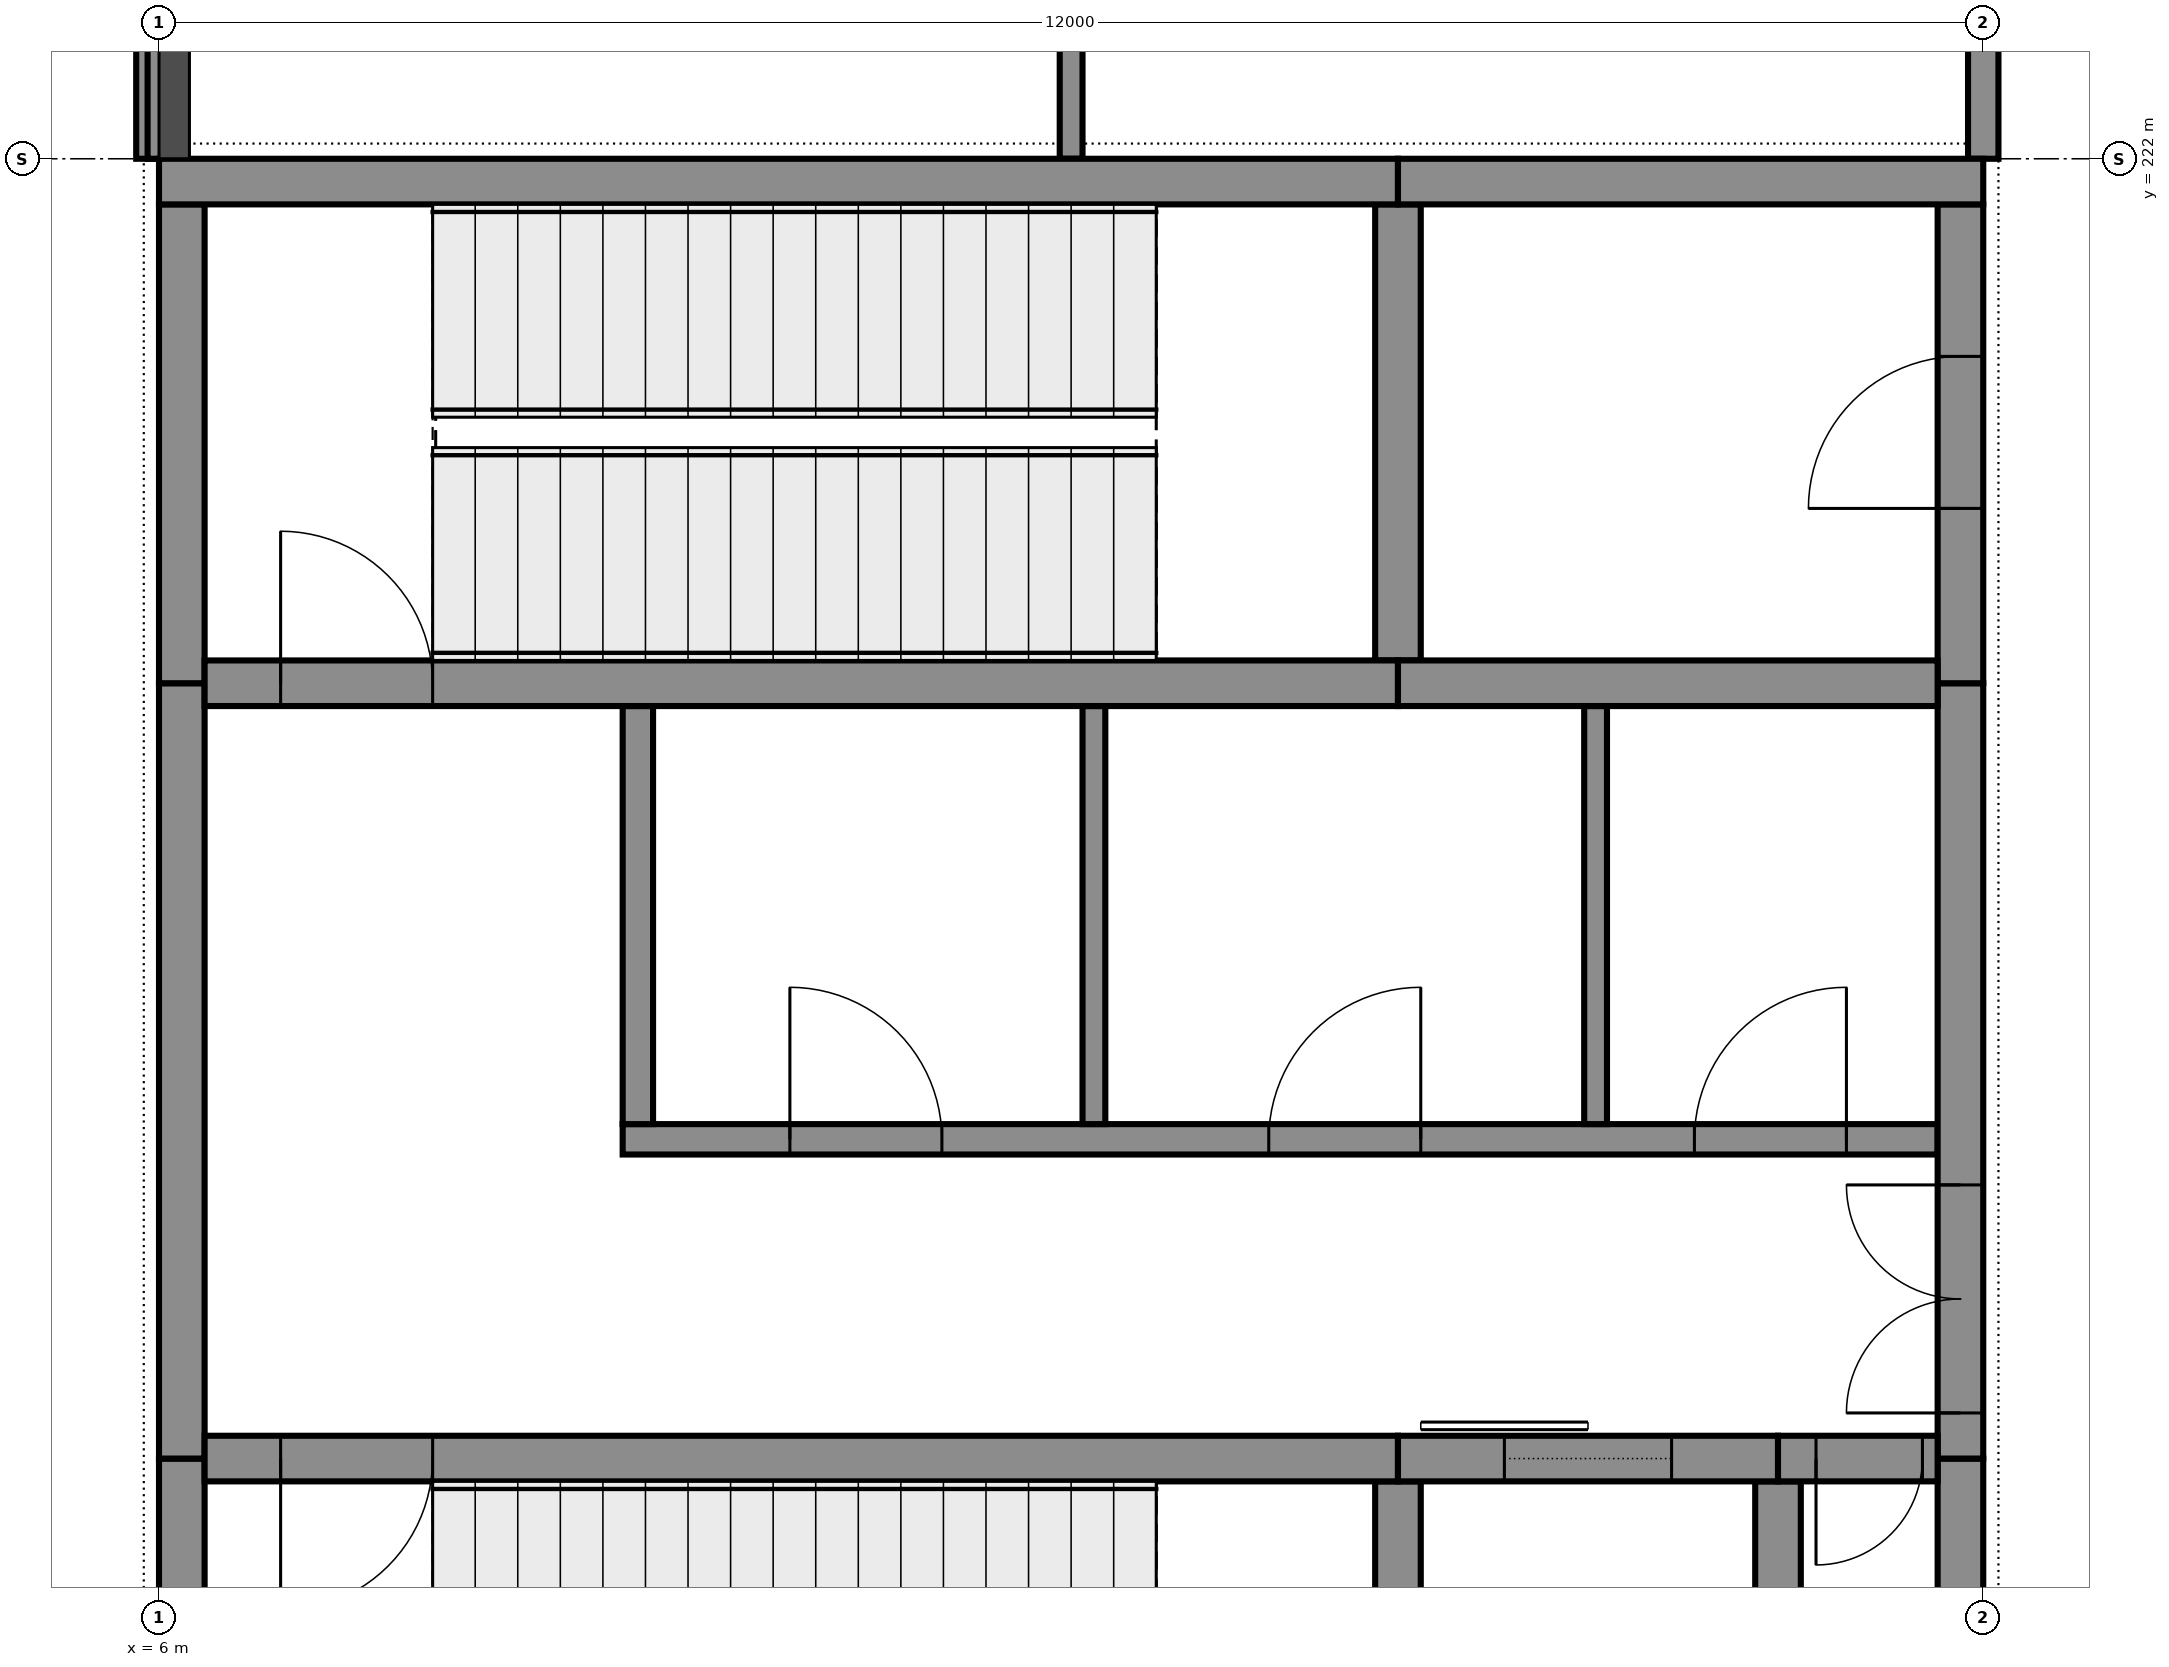
"""IFC4 building model, lengths in metres.
Left out: names, types, materials, properties, quantities, classifications, styles, units other than length and angle.
Written with IfcOpenShell. Run it as: python <this file> out.ifc"""

import sys

from ifc_helpers import new_model, si_unit, direction, frame, frame_2d, origin, place, context, subcontext, project, spatial, rectangle, extrude, element, fill, save


model = new_model("IFC4")
c1 = context("Model", 3, precision=1e-05, world=origin(), true_north=direction((0.0, 1.0)))
c2 = subcontext(c1, "Body", "Model", "MODEL_VIEW")
j1 = project(units=[si_unit("LENGTHUNIT", "METRE"), si_unit("PLANEANGLEUNIT", "RADIAN")], contexts=[c1])
p1 = place(None, origin())
s1 = spatial("IfcSite", under=j1, at=p1, CompositionType="ELEMENT")
p2 = place(p1, origin())
s2 = spatial("IfcBuilding", under=s1, at=p2, CompositionType="ELEMENT")
p3 = place(p2, frame((0.0, 0.0, 6.0)))
s3 = spatial("IfcBuildingStorey", under=s2, at=p3, CompositionType="ELEMENT", Elevation=6.0)
p4 = place(p3, frame((6.0, 221.85, 0.0), z_axis=(0.0, 0.0, 1.0), x_axis=(1.0, 0.0, 0.0)))
e1 = element("IfcWall", 1, at=p4, inside=s3, PredefinedType="SHEAR", context=c2, shape_type="SweptSolid", body=[
    extrude(rectangle(XDim=8.15, YDim=0.3, at=frame_2d((4.075, 0.0))), origin(), (0.0, 0.0, 1.0), 5.75),
])
p5 = place(p3, frame((14.15, 221.85, 0.0), z_axis=(0.0, 0.0, 1.0), x_axis=(1.0, 0.0, 0.0)))
e2 = element("IfcWall", 2, at=p5, inside=s3, PredefinedType="SHEAR", context=c2, shape_type="SweptSolid", body=[
    extrude(rectangle(XDim=3.85, YDim=0.3, at=frame_2d((1.925, 0.0))), origin(), (0.0, 0.0, 1.0), 5.75),
])
p6 = place(p3, frame((6.3, 213.45, 0.0), z_axis=(0.0, 0.0, 1.0), x_axis=(1.0, 0.0, 0.0)))
e3 = element("IfcWall", 3, at=p6, inside=s3, PredefinedType="SHEAR", context=c2, shape_type="SweptSolid", body=[
    extrude(rectangle(XDim=7.85, YDim=0.3, at=frame_2d((3.925, 0.0))), origin(), (0.0, 0.0, 1.0), 5.75),
])
p7 = place(p6, frame((0.5, 0.0, 0.0)))
e4 = element("IfcOpeningElement", 4, at=p7, cuts=e3, PredefinedType="OPENING", context=c2, shape_type="SweptSolid", body=[
    extrude(rectangle(XDim=1.0, YDim=2.1, at=frame_2d((0.5, 1.05))), frame((0.0, 0.16, 0.0), z_axis=(0.0, -1.0, 0.0), x_axis=(1.0, 0.0, 0.0)), (0.0, 0.0, 1.0), 0.32),
])
p8 = place(p3, frame((14.15, 213.45, 0.0), z_axis=(0.0, 0.0, 1.0), x_axis=(1.0, 0.0, 0.0)))
e5 = element("IfcWall", 5, at=p8, inside=s3, PredefinedType="SHEAR", context=c2, shape_type="SweptSolid", body=[
    extrude(rectangle(XDim=2.5, YDim=0.3, at=frame_2d((1.25, 0.0))), origin(), (0.0, 0.0, 1.0), 5.75),
])
p9 = place(p8, frame((0.7, 0.0, 0.0)))
e6 = element("IfcOpeningElement", 6, at=p9, cuts=e5, PredefinedType="OPENING", context=c2, shape_type="SweptSolid", body=[
    extrude(rectangle(XDim=1.1, YDim=2.1, at=frame_2d((0.55, 1.05))), frame((0.0, 0.16, 0.0), z_axis=(0.0, -1.0, 0.0), x_axis=(1.0, 0.0, 0.0)), (0.0, 0.0, 1.0), 0.32),
])
p10 = place(p3, frame((16.65, 213.45, 0.0), z_axis=(0.0, 0.0, 1.0), x_axis=(1.0, 0.0, 0.0)))
e7 = element("IfcWall", 7, at=p10, inside=s3, PredefinedType="SHEAR", context=c2, shape_type="SweptSolid", body=[
    extrude(rectangle(XDim=1.05, YDim=0.3, at=frame_2d((0.525, 0.0))), origin(), (0.0, 0.0, 1.0), 5.75),
])
p11 = place(p10, frame((0.25, 0.0, 0.0)))
e8 = element("IfcOpeningElement", 8, at=p11, cuts=e7, PredefinedType="OPENING", context=c2, shape_type="SweptSolid", body=[
    extrude(rectangle(XDim=0.7, YDim=2.1, at=frame_2d((0.35, 1.05))), frame((0.0, 0.16, 0.0), z_axis=(0.0, -1.0, 0.0), x_axis=(1.0, 0.0, 0.0)), (0.0, 0.0, 1.0), 0.32),
])
p12 = place(p3, frame((6.3, 218.55, 0.0), z_axis=(0.0, 0.0, 1.0), x_axis=(1.0, 0.0, 0.0)))
e9 = element("IfcWall", 9, at=p12, inside=s3, PredefinedType="SHEAR", context=c2, shape_type="SweptSolid", body=[
    extrude(rectangle(XDim=7.85, YDim=0.3, at=frame_2d((3.925, 0.0))), origin(), (0.0, 0.0, 1.0), 5.75),
])
p13 = place(p12, frame((0.5, 0.0, 0.0)))
e10 = element("IfcOpeningElement", 10, at=p13, cuts=e9, PredefinedType="OPENING", context=c2, shape_type="SweptSolid", body=[
    extrude(rectangle(XDim=1.0, YDim=2.1, at=frame_2d((0.5, 1.05))), frame((0.0, 0.16, 0.0), z_axis=(0.0, -1.0, 0.0), x_axis=(1.0, 0.0, 0.0)), (0.0, 0.0, 1.0), 0.32),
])
p14 = place(p3, frame((14.15, 218.55, 0.0), z_axis=(0.0, 0.0, 1.0), x_axis=(1.0, 0.0, 0.0)))
e11 = element("IfcWall", 11, at=p14, inside=s3, PredefinedType="SHEAR", context=c2, shape_type="SweptSolid", body=[
    extrude(rectangle(XDim=3.55, YDim=0.3, at=frame_2d((1.775, 0.0))), origin(), (0.0, 0.0, 1.0), 5.75),
])
p15 = place(p3, frame((6.15, 210.0, 0.0), z_axis=(0.0, 0.0, 1.0), x_axis=(0.0, 1.0, 0.0)))
e12 = element("IfcWall", 12, at=p15, inside=s3, PredefinedType="SHEAR", context=c2, shape_type="SweptSolid", body=[
    extrude(rectangle(XDim=3.45, YDim=0.3, at=frame_2d((1.725, 0.0))), origin(), (0.0, 0.0, 1.0), 5.75),
])
p16 = place(p3, frame((6.15, 213.45, 0.0), z_axis=(0.0, 0.0, 1.0), x_axis=(0.0, 1.0, 0.0)))
e13 = element("IfcWall", 13, at=p16, inside=s3, PredefinedType="SHEAR", context=c2, shape_type="SweptSolid", body=[
    extrude(rectangle(XDim=5.1, YDim=0.3, at=frame_2d((2.55, 0.0))), origin(), (0.0, 0.0, 1.0), 5.75),
])
for number, where, z_axis, x_axis in (
    (14, (6.15, 218.55, 0.0), (0.0, 0.0, 1.0), (0.0, 1.0, 0.0)),
    (15, (17.85, 210.3, 0.0), (0.0, 0.0, 1.0), (0.0, 1.0, 0.0)),
):
    element("IfcWall", number, at=place(p3, frame(where, z_axis=z_axis, x_axis=x_axis)), inside=s3, PredefinedType="SHEAR", context=c2, shape_type="SweptSolid", body=[
        extrude(rectangle(XDim=3.15, YDim=0.3, at=frame_2d((1.575, 0.0))), origin(), (0.0, 0.0, 1.0), 5.75),
    ])
p17 = place(p3, frame((17.85, 213.45, 0.0), z_axis=(0.0, 0.0, 1.0), x_axis=(0.0, 1.0, 0.0)))
e16 = element("IfcWall", 16, at=p17, inside=s3, PredefinedType="SHEAR", context=c2, shape_type="SweptSolid", body=[
    extrude(rectangle(XDim=5.1, YDim=0.3, at=frame_2d((2.55, 0.0))), origin(), (0.0, 0.0, 1.0), 5.75),
])
p18 = place(p17, frame((0.3, 0.0, 0.0)))
e17 = element("IfcOpeningElement", 17, at=p18, cuts=e16, PredefinedType="OPENING", context=c2, shape_type="SweptSolid", body=[
    extrude(rectangle(XDim=1.5, YDim=2.1, at=frame_2d((0.75, 1.05))), frame((0.0, 0.16, 0.0), z_axis=(0.0, -1.0, 0.0), x_axis=(1.0, 0.0, 0.0)), (0.0, 0.0, 1.0), 0.32),
])
p19 = place(p3, frame((17.85, 218.55, 0.0), z_axis=(0.0, 0.0, 1.0), x_axis=(0.0, 1.0, 0.0)))
e18 = element("IfcWall", 18, at=p19, inside=s3, PredefinedType="SHEAR", context=c2, shape_type="SweptSolid", body=[
    extrude(rectangle(XDim=3.15, YDim=0.3, at=frame_2d((1.575, 0.0))), origin(), (0.0, 0.0, 1.0), 5.75),
])
p20 = place(p19, frame((1.15, 0.0, 0.0)))
e19 = element("IfcOpeningElement", 19, at=p20, cuts=e18, PredefinedType="OPENING", context=c2, shape_type="SweptSolid", body=[
    extrude(rectangle(XDim=1.0, YDim=2.1, at=frame_2d((0.5, 1.05))), frame((0.0, 0.16, 0.0), z_axis=(0.0, -1.0, 0.0), x_axis=(1.0, 0.0, 0.0)), (0.0, 0.0, 1.0), 0.32),
])
p21 = place(p3, frame((14.15, 210.0, 0.0), z_axis=(0.0, 0.0, 1.0), x_axis=(0.0, 1.0, 0.0)))
e20 = element("IfcWall", 20, at=p21, inside=s3, PredefinedType="SHEAR", context=c2, shape_type="SweptSolid", body=[
    extrude(rectangle(XDim=3.3, YDim=0.3, at=frame_2d((1.65, 0.0))), origin(), (0.0, 0.0, 1.0), 5.75),
])
for number, where, z_axis, x_axis in (
    (21, (14.15, 218.7, 0.0), (0.0, 0.0, 1.0), (0.0, 1.0, 0.0)),
    (22, (16.65, 210.3, 0.0), (0.0, 0.0, 1.0), (0.0, 1.0, 0.0)),
):
    element("IfcWall", number, at=place(p3, frame(where, z_axis=z_axis, x_axis=x_axis)), inside=s3, PredefinedType="SHEAR", context=c2, shape_type="SweptSolid", body=[
        extrude(rectangle(XDim=3.0, YDim=0.3, at=frame_2d((1.5, 0.0))), origin(), (0.0, 0.0, 1.0), 5.75),
    ])
p22 = place(p3, frame((5.925, 233.5, 5.75), z_axis=(0.0, 0.0, 1.0), x_axis=(0.0, -1.0, 0.0)))
e23 = element("IfcWall", 23, at=p22, inside=s3, PredefinedType="STANDARD", context=c2, shape_type="SweptSolid", body=[
    extrude(rectangle(XDim=11.5, YDim=0.15, at=frame_2d((5.75, 0.0))), origin(), (0.0, 0.0, 1.0), 0.25),
])
p23 = place(p3, frame((9.05, 215.55, 0.0), z_axis=(0.0, 0.0, 1.0), x_axis=(1.0, 0.0, 0.0)))
e24 = element("IfcWall", 24, at=p23, inside=s3, PredefinedType="PARTITIONING", context=c2, shape_type="SweptSolid", body=[
    extrude(rectangle(XDim=8.65, YDim=0.2, at=frame_2d((4.325, 0.0))), origin(), (0.0, 0.0, 1.0), 5.75),
])
p24 = place(p23, frame((1.1, 0.0, 0.0)))
e25 = element("IfcOpeningElement", 25, at=p24, cuts=e24, PredefinedType="OPENING", context=c2, shape_type="SweptSolid", body=[
    extrude(rectangle(XDim=1.0, YDim=2.1, at=frame_2d((0.5, 1.05))), frame((0.0, 0.11, 0.0), z_axis=(0.0, -1.0, 0.0), x_axis=(1.0, 0.0, 0.0)), (0.0, 0.0, 1.0), 0.22),
])
p25 = place(p23, frame((4.25, 0.0, 0.0)))
e26 = element("IfcOpeningElement", 26, at=p25, cuts=e24, PredefinedType="OPENING", context=c2, shape_type="SweptSolid", body=[
    extrude(rectangle(XDim=1.0, YDim=2.1, at=frame_2d((0.5, 1.05))), frame((0.0, 0.11, 0.0), z_axis=(0.0, -1.0, 0.0), x_axis=(1.0, 0.0, 0.0)), (0.0, 0.0, 1.0), 0.22),
])
p26 = place(p23, frame((7.05, 0.0, 0.0)))
e27 = element("IfcOpeningElement", 27, at=p26, cuts=e24, PredefinedType="OPENING", context=c2, shape_type="SweptSolid", body=[
    extrude(rectangle(XDim=1.0, YDim=2.1, at=frame_2d((0.5, 1.05))), frame((0.0, 0.11, 0.0), z_axis=(0.0, -1.0, 0.0), x_axis=(1.0, 0.0, 0.0)), (0.0, 0.0, 1.0), 0.22),
])
p27 = place(p3, frame((6.0, 222.0, 0.0), z_axis=(0.0, 0.0, 1.0), x_axis=(0.0, 1.0, 0.0)))
e28 = element("IfcWall", 28, at=p27, inside=s3, PredefinedType="PARTITIONING", context=c2, shape_type="SweptSolid", body=[
    extrude(rectangle(XDim=7.1, YDim=0.15, at=frame_2d((3.55, 0.0))), origin(), (0.0, 0.0, 1.0), 4.75),
])
p28 = place(p3, frame((9.15, 215.65, 0.0), z_axis=(0.0, 0.0, 1.0), x_axis=(0.0, 1.0, 0.0)))
e29 = element("IfcWall", 29, at=p28, inside=s3, PredefinedType="PARTITIONING", context=c2, shape_type="SweptSolid", body=[
    extrude(rectangle(XDim=2.75, YDim=0.2, at=frame_2d((1.375, 0.0))), origin(), (0.0, 0.0, 1.0), 5.75),
])
p29 = place(p3, frame((12.0, 222.0, 0.0), z_axis=(0.0, 0.0, 1.0), x_axis=(0.0, 1.0, 0.0)))
e30 = element("IfcWall", 30, at=p29, inside=s3, PredefinedType="PARTITIONING", context=c2, shape_type="SweptSolid", body=[
    extrude(rectangle(XDim=7.1, YDim=0.15, at=frame_2d((3.55, 0.0))), origin(), (0.0, 0.0, 1.0), 5.75),
])
for number, where, z_axis, x_axis in (
    (31, (12.15, 215.65, 0.0), (0.0, 0.0, 1.0), (0.0, 1.0, 0.0)),
    (32, (15.45, 215.65, 0.0), (0.0, 0.0, 1.0), (0.0, 1.0, 0.0)),
):
    element("IfcWall", number, at=place(p3, frame(where, z_axis=z_axis, x_axis=x_axis)), inside=s3, PredefinedType="PARTITIONING", context=c2, shape_type="SweptSolid", body=[
        extrude(rectangle(XDim=2.75, YDim=0.15, at=frame_2d((1.375, 0.0))), origin(), (0.0, 0.0, 1.0), 5.75),
    ])
p30 = place(p3, frame((18.0, 222.0, 0.0), z_axis=(0.0, 0.0, 1.0), x_axis=(0.0, 1.0, 0.0)))
e33 = element("IfcWall", 33, at=p30, inside=s3, PredefinedType="PARTITIONING", context=c2, shape_type="SweptSolid", body=[
    extrude(rectangle(XDim=7.1, YDim=0.2, at=frame_2d((3.55, 0.0))), origin(), (0.0, 0.0, 1.0), 4.75),
])
p31 = place(p30, frame((3.1, 0.0, 0.0)))
e34 = element("IfcOpeningElement", 34, at=p31, cuts=e33, PredefinedType="OPENING", context=c2, shape_type="SweptSolid", body=[
    extrude(rectangle(XDim=1.0, YDim=2.1, at=frame_2d((0.5, 1.05))), frame((0.0, 0.11, 0.0), z_axis=(0.0, -1.0, 0.0), x_axis=(1.0, 0.0, 0.0)), (0.0, 0.0, 1.0), 0.22),
])
p32 = place(p7, frame((1.0, 0.0, 0.0), z_axis=(0.0, 0.0, 1.0), x_axis=(-1.0, 0.0, 0.0)))
e35 = element("IfcDoor", 35, at=p32, inside=s3, OperationType="SINGLE_SWING_LEFT", PredefinedType="DOOR", context=c2, shape_type="SweptSolid", body=[
    extrude(rectangle(XDim=1.0, YDim=2.1, at=frame_2d((0.5, 1.05))), frame((0.0, 0.025, 0.0), z_axis=(0.0, -1.0, 0.0), x_axis=(1.0, 0.0, 0.0)), (0.0, 0.0, 1.0), 0.05),
])
fill(e4, e35)
p33 = place(p9, origin())
e36 = element("IfcDoor", 36, at=p33, inside=s3, OperationType="SLIDING_TO_LEFT", PredefinedType="DOOR", context=c2, shape_type="SweptSolid", body=[
    extrude(rectangle(XDim=1.1, YDim=2.1, at=frame_2d((0.55, 1.05))), frame((0.0, 0.025, 0.0), z_axis=(0.0, -1.0, 0.0), x_axis=(1.0, 0.0, 0.0)), (0.0, 0.0, 1.0), 0.05),
])
fill(e6, e36)
p34 = place(p11, frame((0.7, 0.0, 0.0), z_axis=(0.0, 0.0, 1.0), x_axis=(-1.0, 0.0, 0.0)))
e37 = element("IfcDoor", 37, at=p34, inside=s3, OperationType="SINGLE_SWING_LEFT", PredefinedType="DOOR", context=c2, shape_type="SweptSolid", body=[
    extrude(rectangle(XDim=0.7, YDim=2.1, at=frame_2d((0.35, 1.05))), frame((0.0, 0.025, 0.0), z_axis=(0.0, -1.0, 0.0), x_axis=(1.0, 0.0, 0.0)), (0.0, 0.0, 1.0), 0.05),
])
fill(e8, e37)
p35 = place(p18, origin())
e38 = element("IfcDoor", 38, at=p35, inside=s3, OperationType="DOUBLE_DOOR_SINGLE_SWING", PredefinedType="DOOR", context=c2, shape_type="SweptSolid", body=[
    extrude(rectangle(XDim=1.5, YDim=2.1, at=frame_2d((0.75, 1.05))), frame((0.0, 0.025, 0.0), z_axis=(0.0, -1.0, 0.0), x_axis=(1.0, 0.0, 0.0)), (0.0, 0.0, 1.0), 0.05),
])
fill(e17, e38)
p36 = place(p24, origin())
e39 = element("IfcDoor", 39, at=p36, inside=s3, OperationType="SINGLE_SWING_RIGHT", PredefinedType="DOOR", context=c2, shape_type="SweptSolid", body=[
    extrude(rectangle(XDim=1.0, YDim=2.1, at=frame_2d((0.5, 1.05))), frame((0.0, 0.025, 0.0), z_axis=(0.0, -1.0, 0.0), x_axis=(1.0, 0.0, 0.0)), (0.0, 0.0, 1.0), 0.05),
])
fill(e25, e39)
p37 = place(p25, origin())
e40 = element("IfcDoor", 40, at=p37, inside=s3, OperationType="SINGLE_SWING_LEFT", PredefinedType="DOOR", context=c2, shape_type="SweptSolid", body=[
    extrude(rectangle(XDim=1.0, YDim=2.1, at=frame_2d((0.5, 1.05))), frame((0.0, 0.025, 0.0), z_axis=(0.0, -1.0, 0.0), x_axis=(1.0, 0.0, 0.0)), (0.0, 0.0, 1.0), 0.05),
])
fill(e26, e40)
p38 = place(p26, origin())
e41 = element("IfcDoor", 41, at=p38, inside=s3, OperationType="SINGLE_SWING_LEFT", PredefinedType="DOOR", context=c2, shape_type="SweptSolid", body=[
    extrude(rectangle(XDim=1.0, YDim=2.1, at=frame_2d((0.5, 1.05))), frame((0.0, 0.025, 0.0), z_axis=(0.0, -1.0, 0.0), x_axis=(1.0, 0.0, 0.0)), (0.0, 0.0, 1.0), 0.05),
])
fill(e27, e41)
p39 = place(p13, origin())
e42 = element("IfcDoor", 42, at=p39, inside=s3, OperationType="SINGLE_SWING_RIGHT", PredefinedType="DOOR", context=c2, shape_type="SweptSolid", body=[
    extrude(rectangle(XDim=1.0, YDim=2.1, at=frame_2d((0.5, 1.05))), frame((0.0, 0.025, 0.0), z_axis=(0.0, -1.0, 0.0), x_axis=(1.0, 0.0, 0.0)), (0.0, 0.0, 1.0), 0.05),
])
fill(e10, e42)
p40 = place(p20, origin())
e43 = element("IfcDoor", 43, at=p40, inside=s3, OperationType="SINGLE_SWING_RIGHT", PredefinedType="DOOR", context=c2, shape_type="SweptSolid", body=[
    extrude(rectangle(XDim=1.0, YDim=2.1, at=frame_2d((0.5, 1.05))), frame((0.0, 0.025, 0.0), z_axis=(0.0, -1.0, 0.0), x_axis=(1.0, 0.0, 0.0)), (0.0, 0.0, 1.0), 0.05),
])
fill(e19, e43)
save(model, sys.argv[1])
